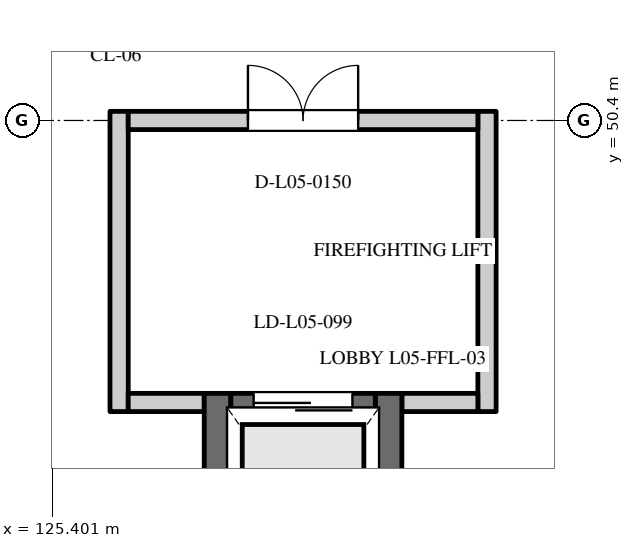
"""IFC4 building model, lengths in metres.
Left out: names, types, materials, properties, quantities, classifications, styles, units other than length and angle.
Written with IfcOpenShell. Run it as: python <this file> out.ifc"""

import sys

from ifc_helpers import new_model, si_unit, direction, frame, frame_2d, origin, place, context, subcontext, project, spatial, rectangle, extrude, element, fill, save


model = new_model("IFC4")
c1 = context("Model", 3, precision=1e-05, world=origin(), true_north=direction((0.0, 1.0)))
c2 = subcontext(c1, "Body", "Model", "MODEL_VIEW")
j1 = project(units=[si_unit("LENGTHUNIT", "METRE"), si_unit("PLANEANGLEUNIT", "RADIAN")], contexts=[c1])
p1 = place(None, origin())
s1 = spatial("IfcSite", under=j1, at=p1, CompositionType="ELEMENT")
p2 = place(p1, origin())
s2 = spatial("IfcBuilding", under=s1, at=p2, CompositionType="ELEMENT")
p3 = place(p2, frame((0.0, 0.0, 22.2)))
s3 = spatial("IfcBuildingStorey", under=s2, at=p3, CompositionType="ELEMENT", Elevation=22.2)
for number, where, z_axis, x_axis in (
    (1, (127.575, 43.06, 0.0), (0.0, 0.0, 1.0), (0.0, 1.0, 0.0)),
    (2, (129.825, 43.06, 0.0), (0.0, 0.0, 1.0), (0.0, 1.0, 0.0)),
):
    element("IfcWall", number, at=place(p3, frame(where, z_axis=z_axis, x_axis=x_axis)), inside=s3, PredefinedType="SHEAR", context=c2, shape_type="SweptSolid", body=[
        extrude(rectangle(XDim=3.75, YDim=0.35, at=frame_2d((1.875, 0.0))), origin(), (0.0, 0.0, 1.0), 3.9),
    ])
p4 = place(p3, frame((127.75, 46.635, 0.0), z_axis=(0.0, 0.0, 1.0), x_axis=(1.0, 0.0, 0.0)))
e3 = element("IfcWall", 3, at=p4, inside=s3, PredefinedType="SHEAR", context=c2, shape_type="SweptSolid", body=[
    extrude(rectangle(XDim=1.9, YDim=0.35, at=frame_2d((0.95, 0.0))), origin(), (0.0, 0.0, 1.0), 3.6),
])
p5 = place(p4, frame((0.3, 0.0, 0.0)))
e4 = element("IfcOpeningElement", 4, at=p5, cuts=e3, PredefinedType="OPENING", context=c2, shape_type="SweptSolid", body=[
    extrude(rectangle(XDim=1.3, YDim=2.2, at=frame_2d((0.65, 1.1))), frame((0.0, 0.187, 0.0), z_axis=(0.0, -1.0, 0.0), x_axis=(1.0, 0.0, 0.0)), (0.0, 0.0, 1.0), 0.374),
])
for number, where, z_axis, x_axis in (
    (5, (126.28, 46.57, 0.0), (0.0, 0.0, 1.0), (0.0, 1.0, 0.0)),
    (6, (131.12, 46.57, 0.0), (0.0, 0.0, 1.0), (0.0, 1.0, 0.0)),
):
    element("IfcWall", number, at=place(p3, frame(where, z_axis=z_axis, x_axis=x_axis)), inside=s3, PredefinedType="STANDARD", context=c2, shape_type="SweptSolid", body=[
        extrude(rectangle(XDim=3.95, YDim=0.24, at=frame_2d((1.975, 0.0))), origin(), (0.0, 0.0, 1.0), 3.1),
    ])
for number, where, z_axis, x_axis in (
    (7, (126.4, 46.69, 0.0), (0.0, 0.0, 1.0), (1.0, 0.0, 0.0)),
    (8, (130.0, 46.69, 0.0), (0.0, 0.0, 1.0), (1.0, 0.0, 0.0)),
):
    element("IfcWall", number, at=place(p3, frame(where, z_axis=z_axis, x_axis=x_axis)), inside=s3, PredefinedType="STANDARD", context=c2, shape_type="SweptSolid", body=[
        extrude(rectangle(XDim=1.0, YDim=0.24, at=frame_2d((0.5, 0.0))), origin(), (0.0, 0.0, 1.0), 3.1),
    ])
p6 = place(p3, frame((126.4, 50.4, 0.0), z_axis=(0.0, 0.0, 1.0), x_axis=(1.0, 0.0, 0.0)))
e9 = element("IfcWall", 9, at=p6, inside=s3, PredefinedType="STANDARD", context=c2, shape_type="SweptSolid", body=[
    extrude(rectangle(XDim=4.6, YDim=0.24, at=frame_2d((2.3, 0.0))), origin(), (0.0, 0.0, 1.0), 3.1),
])
p7 = place(p6, frame((1.575, 0.0, 0.0)))
e10 = element("IfcOpeningElement", 10, at=p7, cuts=e9, PredefinedType="OPENING", context=c2, shape_type="SweptSolid", body=[
    extrude(rectangle(XDim=1.45, YDim=2.2, at=frame_2d((0.725, 1.1))), frame((0.0, 0.132, 0.0), z_axis=(0.0, -1.0, 0.0), x_axis=(1.0, 0.0, 0.0)), (0.0, 0.0, 1.0), 0.264),
])
p8 = place(p5, origin())
e11 = element("IfcDoor", 11, at=p8, inside=s3, OperationType="SLIDING_TO_LEFT", PredefinedType="DOOR", context=c2, shape_type="SweptSolid", body=[
    extrude(rectangle(XDim=1.3, YDim=2.2, at=frame_2d((0.65, 1.1))), frame((0.0, 0.025, 0.0), z_axis=(0.0, -1.0, 0.0), x_axis=(1.0, 0.0, 0.0)), (0.0, 0.0, 1.0), 0.05),
])
fill(e4, e11)
p9 = place(p7, origin())
e12 = element("IfcDoor", 12, at=p9, inside=s3, OperationType="DOUBLE_DOOR_SINGLE_SWING", PredefinedType="DOOR", context=c2, shape_type="SweptSolid", body=[
    extrude(rectangle(XDim=1.45, YDim=2.2, at=frame_2d((0.725, 1.1))), frame((0.0, 0.025, 0.0), z_axis=(0.0, -1.0, 0.0), x_axis=(1.0, 0.0, 0.0)), (0.0, 0.0, 1.0), 0.05),
])
fill(e10, e12)
save(model, sys.argv[1])
